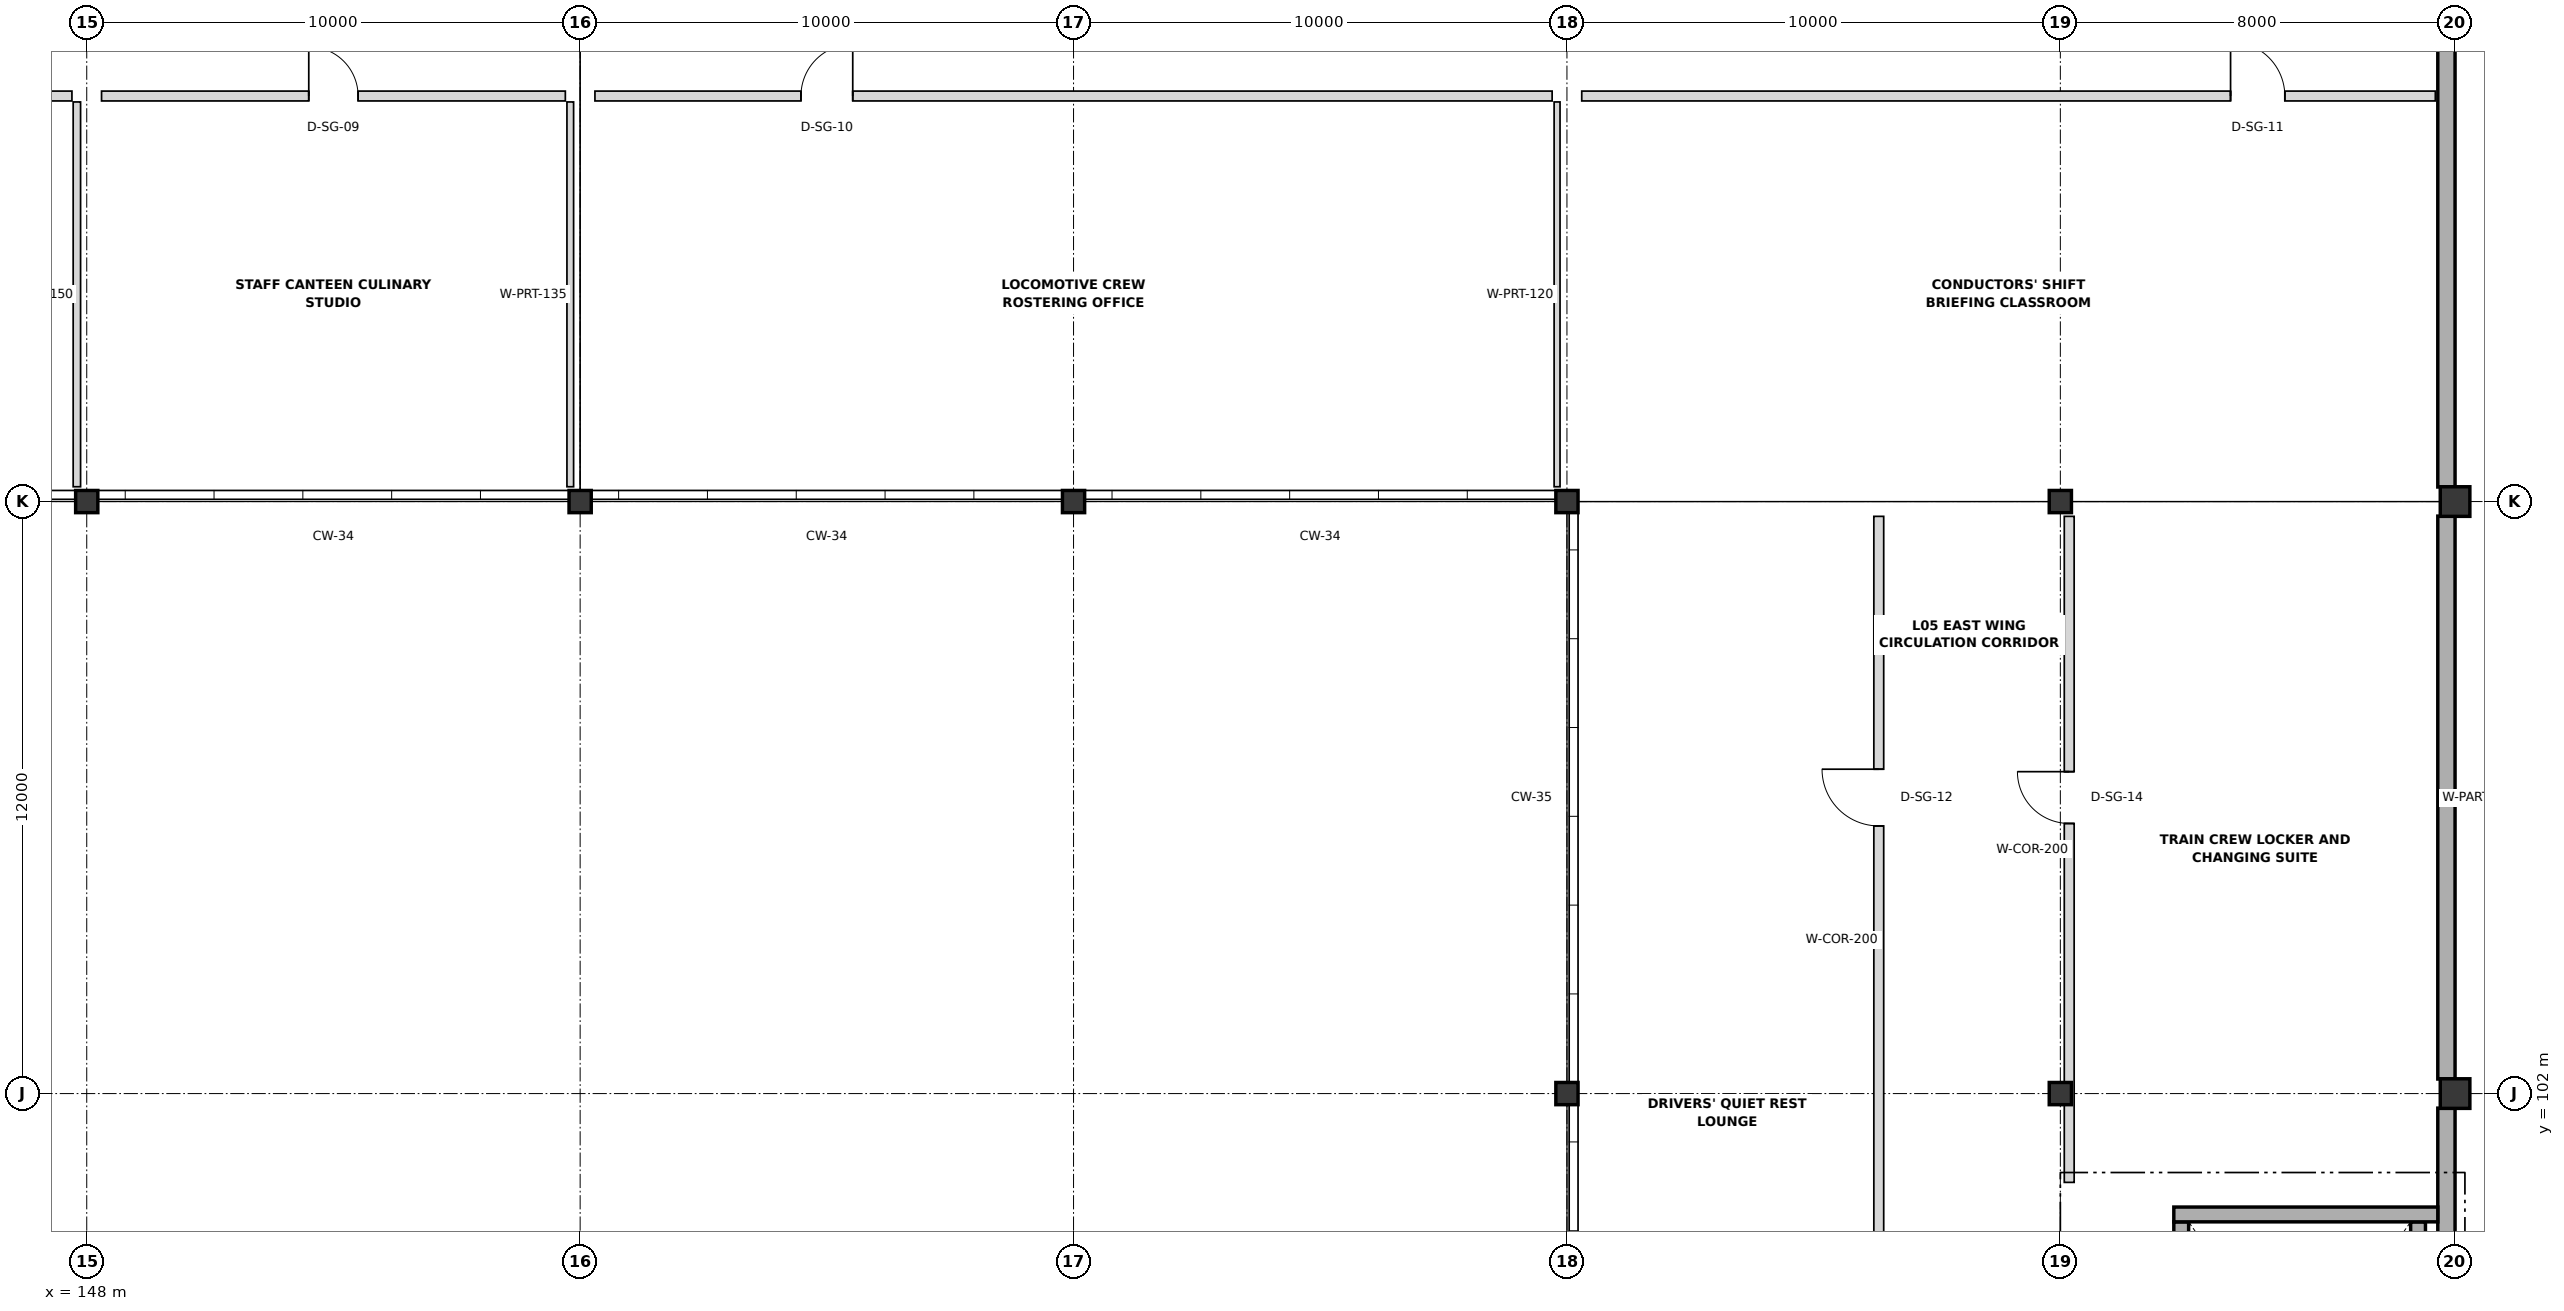
"""IFC4 building model, lengths in metres.
Left out: names, types, materials, properties, quantities, classifications, styles, units other than length and angle.
Written with IfcOpenShell. Run it as: python <this file> out.ifc"""

import sys

from ifc_helpers import new_model, si_unit, direction, frame, frame_2d, origin, origin_2d, place, context, subcontext, project, spatial, rectangle, extrude, element, fill, save


model = new_model("IFC4")
c1 = context("Model", 3, precision=1e-05, world=origin(), true_north=direction((0.0, 1.0)))
c2 = subcontext(c1, "Body", "Model", "MODEL_VIEW")
j1 = project(units=[si_unit("LENGTHUNIT", "METRE"), si_unit("PLANEANGLEUNIT", "RADIAN")], contexts=[c1])
p1 = place(None, origin())
s1 = spatial("IfcSite", under=j1, at=p1, CompositionType="ELEMENT")
p2 = place(p1, origin())
s2 = spatial("IfcBuilding", under=s1, at=p2, CompositionType="ELEMENT")
p3 = place(p2, frame((0.0, 0.0, 22.8)))
s3 = spatial("IfcBuildingStorey", under=s2, at=p3, CompositionType="ELEMENT", Elevation=22.8)
for number, where, z_axis, x_axis in (
    (1, (148.0, 114.0, 0.0), (0.0, 0.0, 1.0), (1.0, 0.0, 0.0)),
    (2, (158.0, 114.0, 0.0), (0.0, 0.0, 1.0), (1.0, 0.0, 0.0)),
    (3, (168.0, 114.0, 0.0), (0.0, 0.0, 1.0), (1.0, 0.0, 0.0)),
    (4, (178.0, 102.0, 0.0), (0.0, 0.0, 1.0), (1.0, 0.0, 0.0)),
    (5, (178.0, 114.0, 0.0), (0.0, 0.0, 1.0), (1.0, 0.0, 0.0)),
    (6, (188.0, 102.0, 0.0), (0.0, 0.0, 1.0), (1.0, 0.0, 0.0)),
    (7, (188.0, 114.0, 0.0), (0.0, 0.0, 1.0), (1.0, 0.0, 0.0)),
):
    element("IfcColumn", number, at=place(p3, frame(where, z_axis=z_axis, x_axis=x_axis)), inside=s3, PredefinedType="COLUMN", context=c2, shape_type="SweptSolid", body=[
        extrude(rectangle(XDim=0.45, YDim=0.45, at=origin_2d()), origin(), (0.0, 0.0, 1.0), 4.2),
    ])
for number, where, z_axis, x_axis in (
    (8, (196.0, 102.0, 0.0), (0.0, 0.0, 1.0), (1.0, 0.0, 0.0)),
    (9, (196.0, 114.0, 0.0), (0.0, 0.0, 1.0), (1.0, 0.0, 0.0)),
):
    element("IfcColumn", number, at=place(p3, frame(where, z_axis=z_axis, x_axis=x_axis)), inside=s3, PredefinedType="COLUMN", context=c2, shape_type="SweptSolid", body=[
        extrude(rectangle(XDim=0.6, YDim=0.6, at=origin_2d()), origin(), (0.0, 0.0, 1.0), 4.2),
    ])
for number, where, z_axis, x_axis in (
    (10, (195.825, 101.705, 0.0), (0.0, 0.0, 1.0), (0.0, -1.0, 0.0)),
    (11, (195.825, 113.705, 0.0), (0.0, 0.0, 1.0), (0.0, -1.0, 0.0)),
    (12, (195.825, 125.705, 0.0), (0.0, 0.0, 1.0), (0.0, -1.0, 0.0)),
):
    element("IfcWall", number, at=place(p3, frame(where, z_axis=z_axis, x_axis=x_axis)), inside=s3, PredefinedType="SOLIDWALL", context=c2, shape_type="SweptSolid", body=[
        extrude(rectangle(XDim=11.41, YDim=0.35, at=frame_2d((5.705, 0.0))), origin(), (0.0, 0.0, 1.0), 4.2),
    ])
for number, where, z_axis, x_axis in (
    (13, (190.45, 90.8, 0.0), (0.0, 0.0, 1.0), (0.0, 1.0, 0.0)),
    (14, (195.25, 99.4, 0.0), (0.0, 0.0, 1.0), (0.0, -1.0, 0.0)),
):
    element("IfcWall", number, at=place(p3, frame(where, z_axis=z_axis, x_axis=x_axis)), inside=s3, PredefinedType="SHEAR", context=c2, shape_type="SweptSolid", body=[
        extrude(rectangle(XDim=8.6, YDim=0.3, at=frame_2d((4.3, 0.0))), origin(), (0.0, 0.0, 1.0), 3.95),
    ])
p4 = place(p3, frame((190.3, 99.55, 0.0), z_axis=(0.0, 0.0, 1.0), x_axis=(1.0, 0.0, 0.0)))
e15 = element("IfcWall", 15, at=p4, inside=s3, PredefinedType="SHEAR", context=c2, shape_type="SweptSolid", body=[
    extrude(rectangle(XDim=5.35, YDim=0.3, at=frame_2d((2.675, 0.0))), origin(), (0.0, 0.0, 1.0), 3.95),
])
p5 = place(p3, frame((118.4, 122.22, 0.0), z_axis=(0.0, 0.0, 1.0), x_axis=(1.0, 0.0, 0.0)))
e16 = element("IfcWall", 16, at=p5, inside=s3, PredefinedType="PARTITIONING", context=c2, shape_type="SweptSolid", body=[
    extrude(rectangle(XDim=29.3, YDim=0.2, at=frame_2d((14.65, 0.0))), origin(), (0.0, 0.0, 1.0), 3.188),
])
p6 = place(p5, frame((13.8, 0.0, 0.0)))
e17 = element("IfcOpeningElement", 17, at=p6, cuts=e16, PredefinedType="OPENING", context=c2, shape_type="SweptSolid", body=[
    extrude(rectangle(XDim=1.6, YDim=2.15, at=frame_2d((0.8, 1.075))), frame((0.0, 0.11, 0.0), z_axis=(0.0, -1.0, 0.0), x_axis=(1.0, 0.0, 0.0)), (0.0, 0.0, 1.0), 0.22),
])
p7 = place(p3, frame((147.8, 114.3, 0.0), z_axis=(0.0, 0.0, 1.0), x_axis=(0.0, 1.0, 0.0)))
e18 = element("IfcWall", 18, at=p7, inside=s3, PredefinedType="PARTITIONING", context=c2, shape_type="SweptSolid", body=[
    extrude(rectangle(XDim=7.8, YDim=0.15, at=frame_2d((3.9, 0.0))), origin(), (0.0, 0.0, 1.0), 3.188),
])
p8 = place(p3, frame((148.3, 122.22, 0.0), z_axis=(0.0, 0.0, 1.0), x_axis=(1.0, 0.0, 0.0)))
e19 = element("IfcWall", 19, at=p8, inside=s3, PredefinedType="PARTITIONING", context=c2, shape_type="SweptSolid", body=[
    extrude(rectangle(XDim=9.4, YDim=0.2, at=frame_2d((4.7, 0.0))), origin(), (0.0, 0.0, 1.0), 3.188),
])
p9 = place(p8, frame((4.2, 0.0, 0.0)))
e20 = element("IfcOpeningElement", 20, at=p9, cuts=e19, PredefinedType="OPENING", context=c2, shape_type="SweptSolid", body=[
    extrude(rectangle(XDim=1.0, YDim=2.2, at=frame_2d((0.5, 1.1))), frame((0.0, 0.11, 0.0), z_axis=(0.0, -1.0, 0.0), x_axis=(1.0, 0.0, 0.0)), (0.0, 0.0, 1.0), 0.22),
])
p10 = place(p3, frame((157.8, 114.3, 0.0), z_axis=(0.0, 0.0, 1.0), x_axis=(0.0, 1.0, 0.0)))
e21 = element("IfcWall", 21, at=p10, inside=s3, PredefinedType="PARTITIONING", context=c2, shape_type="SweptSolid", body=[
    extrude(rectangle(XDim=7.8, YDim=0.135, at=frame_2d((3.9, 0.0))), origin(), (0.0, 0.0, 1.0), 3.188),
])
p11 = place(p3, frame((158.3, 122.22, 0.0), z_axis=(0.0, 0.0, 1.0), x_axis=(1.0, 0.0, 0.0)))
e22 = element("IfcWall", 22, at=p11, inside=s3, PredefinedType="PARTITIONING", context=c2, shape_type="SweptSolid", body=[
    extrude(rectangle(XDim=19.4, YDim=0.2, at=frame_2d((9.7, 0.0))), origin(), (0.0, 0.0, 1.0), 3.188),
])
p12 = place(p11, frame((4.175, 0.0, 0.0)))
e23 = element("IfcOpeningElement", 23, at=p12, cuts=e22, PredefinedType="OPENING", context=c2, shape_type="SweptSolid", body=[
    extrude(rectangle(XDim=1.05, YDim=2.2, at=frame_2d((0.525, 1.1))), frame((0.0, 0.11, 0.0), z_axis=(0.0, -1.0, 0.0), x_axis=(1.0, 0.0, 0.0)), (0.0, 0.0, 1.0), 0.22),
])
p13 = place(p3, frame((177.8, 114.3, 0.0), z_axis=(0.0, 0.0, 1.0), x_axis=(0.0, 1.0, 0.0)))
e24 = element("IfcWall", 24, at=p13, inside=s3, PredefinedType="PARTITIONING", context=c2, shape_type="SweptSolid", body=[
    extrude(rectangle(XDim=7.8, YDim=0.12, at=frame_2d((3.9, 0.0))), origin(), (0.0, 0.0, 1.0), 3.188),
])
p14 = place(p3, frame((178.3, 122.22, 0.0), z_axis=(0.0, 0.0, 1.0), x_axis=(1.0, 0.0, 0.0)))
e25 = element("IfcWall", 25, at=p14, inside=s3, PredefinedType="PARTITIONING", context=c2, shape_type="SweptSolid", body=[
    extrude(rectangle(XDim=17.3, YDim=0.2, at=frame_2d((8.65, 0.0))), origin(), (0.0, 0.0, 1.0), 3.188),
])
p15 = place(p14, frame((13.15, 0.0, 0.0)))
e26 = element("IfcOpeningElement", 26, at=p15, cuts=e25, PredefinedType="OPENING", context=c2, shape_type="SweptSolid", body=[
    extrude(rectangle(XDim=1.1, YDim=2.2, at=frame_2d((0.55, 1.1))), frame((0.0, 0.11, 0.0), z_axis=(0.0, -1.0, 0.0), x_axis=(1.0, 0.0, 0.0)), (0.0, 0.0, 1.0), 0.22),
])
p16 = place(p3, frame((184.32, 96.3, 0.0), z_axis=(0.0, 0.0, 1.0), x_axis=(0.0, 1.0, 0.0)))
e27 = element("IfcWall", 27, at=p16, inside=s3, PredefinedType="PARTITIONING", context=c2, shape_type="SweptSolid", body=[
    extrude(rectangle(XDim=17.4, YDim=0.2, at=frame_2d((8.7, 0.0))), origin(), (0.0, 0.0, 1.0), 3.288),
])
p17 = place(p16, frame((11.125, 0.0, 0.0)))
e28 = element("IfcOpeningElement", 28, at=p17, cuts=e27, PredefinedType="OPENING", context=c2, shape_type="SweptSolid", body=[
    extrude(rectangle(XDim=1.15, YDim=2.2, at=frame_2d((0.575, 1.1))), frame((0.0, 0.11, 0.0), z_axis=(0.0, -1.0, 0.0), x_axis=(1.0, 0.0, 0.0)), (0.0, 0.0, 1.0), 0.22),
])
p18 = place(p3, frame((188.18, 100.2, 0.0), z_axis=(0.0, 0.0, 1.0), x_axis=(0.0, 1.0, 0.0)))
e29 = element("IfcWall", 29, at=p18, inside=s3, PredefinedType="PARTITIONING", context=c2, shape_type="SweptSolid", body=[
    extrude(rectangle(XDim=13.5, YDim=0.2, at=frame_2d((6.75, 0.0))), origin(), (0.0, 0.0, 1.0), 3.188),
])
p19 = place(p18, frame((7.275, 0.0, 0.0)))
e30 = element("IfcOpeningElement", 30, at=p19, cuts=e29, PredefinedType="OPENING", context=c2, shape_type="SweptSolid", body=[
    extrude(rectangle(XDim=1.05, YDim=2.3, at=frame_2d((0.525, 1.15))), frame((0.0, 0.11, 0.0), z_axis=(0.0, -1.0, 0.0), x_axis=(1.0, 0.0, 0.0)), (0.0, 0.0, 1.0), 0.22),
])
p20 = place(p9, origin())
e31 = element("IfcDoor", 31, at=p20, inside=s3, OperationType="SINGLE_SWING_LEFT", PredefinedType="DOOR", context=c2, shape_type="SweptSolid", body=[
    extrude(rectangle(XDim=1.0, YDim=2.2, at=frame_2d((0.5, 1.1))), frame((0.0, 0.025, 0.0), z_axis=(0.0, -1.0, 0.0), x_axis=(1.0, 0.0, 0.0)), (0.0, 0.0, 1.0), 0.05),
])
fill(e20, e31)
p21 = place(p12, origin())
e32 = element("IfcDoor", 32, at=p21, inside=s3, OperationType="SINGLE_SWING_RIGHT", PredefinedType="DOOR", context=c2, shape_type="SweptSolid", body=[
    extrude(rectangle(XDim=1.05, YDim=2.2, at=frame_2d((0.525, 1.1))), frame((0.0, 0.025, 0.0), z_axis=(0.0, -1.0, 0.0), x_axis=(1.0, 0.0, 0.0)), (0.0, 0.0, 1.0), 0.05),
])
fill(e23, e32)
p22 = place(p15, origin())
e33 = element("IfcDoor", 33, at=p22, inside=s3, OperationType="SINGLE_SWING_LEFT", PredefinedType="DOOR", context=c2, shape_type="SweptSolid", body=[
    extrude(rectangle(XDim=1.1, YDim=2.2, at=frame_2d((0.55, 1.1))), frame((0.0, 0.025, 0.0), z_axis=(0.0, -1.0, 0.0), x_axis=(1.0, 0.0, 0.0)), (0.0, 0.0, 1.0), 0.05),
])
fill(e26, e33)
p23 = place(p17, origin())
e34 = element("IfcDoor", 34, at=p23, inside=s3, OperationType="SINGLE_SWING_RIGHT", PredefinedType="DOOR", context=c2, shape_type="SweptSolid", body=[
    extrude(rectangle(XDim=1.15, YDim=2.2, at=frame_2d((0.575, 1.1))), frame((0.0, 0.025, 0.0), z_axis=(0.0, -1.0, 0.0), x_axis=(1.0, 0.0, 0.0)), (0.0, 0.0, 1.0), 0.05),
])
fill(e28, e34)
p24 = place(p19, origin())
e35 = element("IfcDoor", 35, at=p24, inside=s3, OperationType="SINGLE_SWING_RIGHT", PredefinedType="DOOR", context=c2, shape_type="SweptSolid", body=[
    extrude(rectangle(XDim=1.05, YDim=2.3, at=frame_2d((0.525, 1.15))), frame((0.0, 0.025, 0.0), z_axis=(0.0, -1.0, 0.0), x_axis=(1.0, 0.0, 0.0)), (0.0, 0.0, 1.0), 0.05),
])
fill(e30, e35)
save(model, sys.argv[1])
